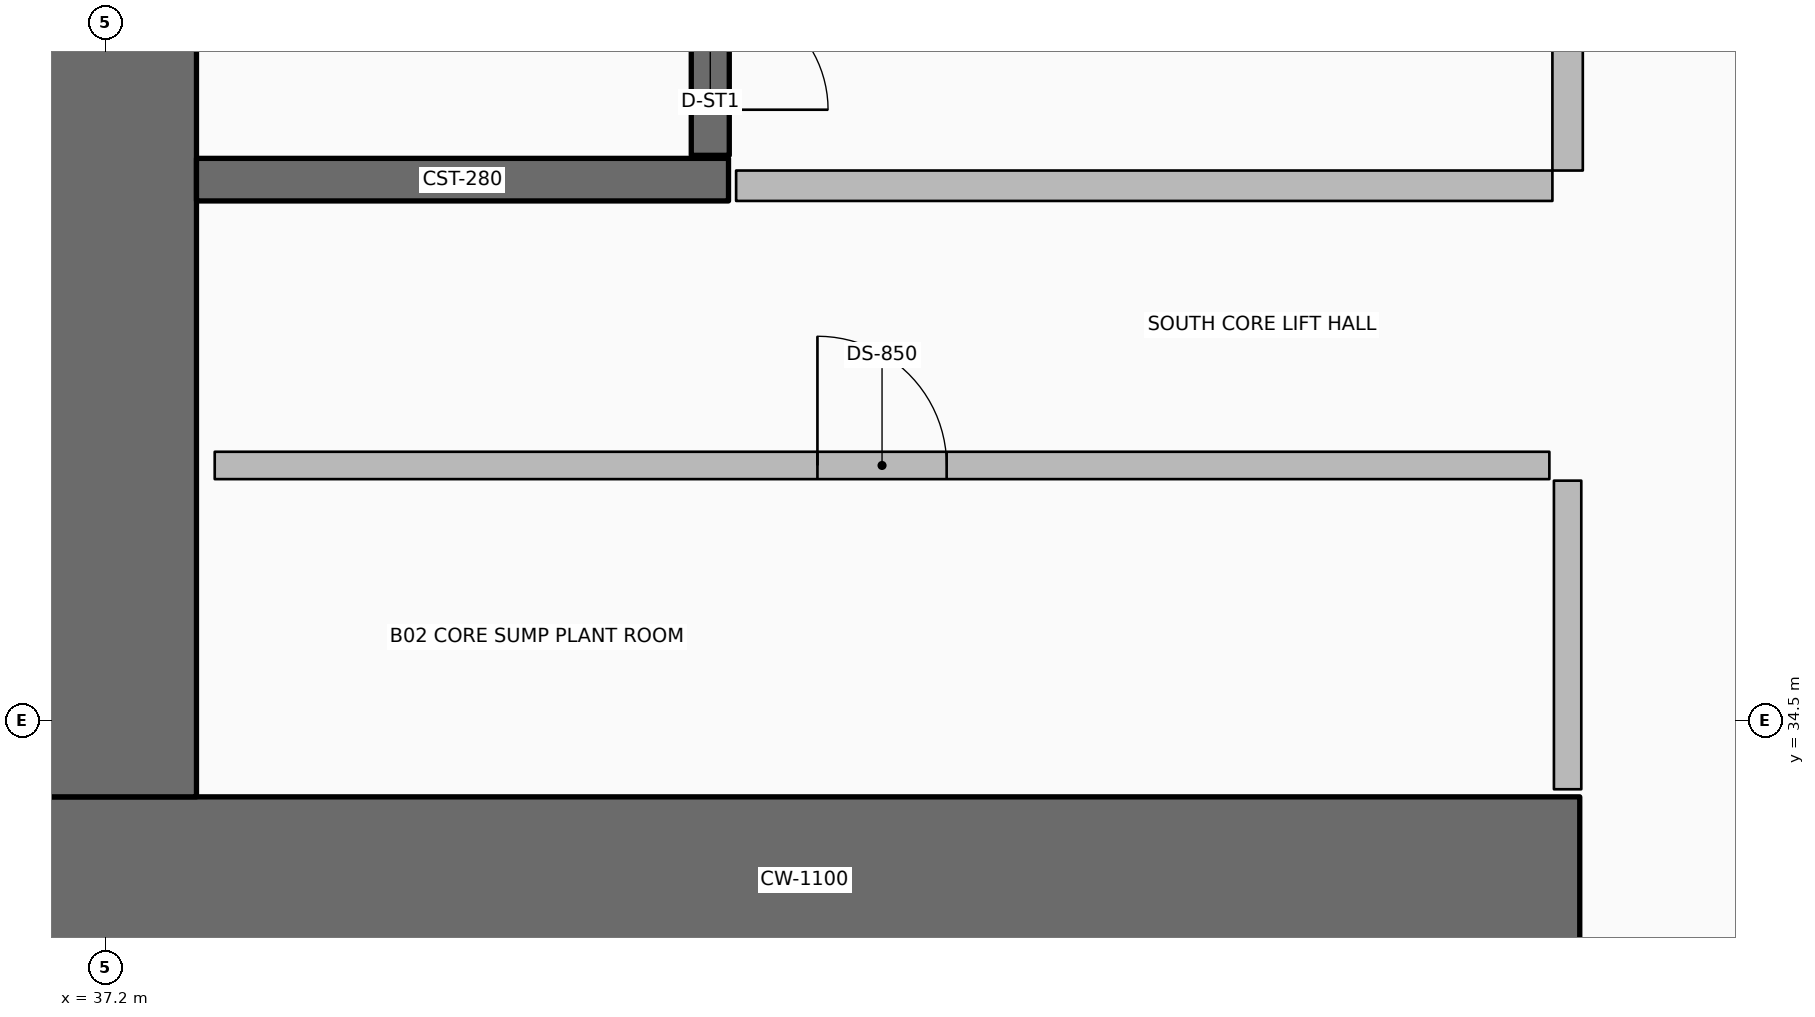
"""IFC4 building model, lengths in metres.
Left out: names, types, materials, properties, quantities, classifications, styles, units other than length and angle.
Written with IfcOpenShell. Run it as: python <this file> out.ifc"""

import sys

from ifc_helpers import new_model, si_unit, direction, frame, frame_2d, origin, place, context, subcontext, project, spatial, rectangle, extrude, element, fill, save


model = new_model("IFC4")
c1 = context("Model", 3, precision=1e-05, world=origin(), true_north=direction((0.0, 1.0)))
c2 = subcontext(c1, "Body", "Model", "MODEL_VIEW")
j1 = project(units=[si_unit("LENGTHUNIT", "METRE"), si_unit("PLANEANGLEUNIT", "RADIAN")], contexts=[c1])
p1 = place(None, origin())
s1 = spatial("IfcSite", under=j1, at=p1, CompositionType="ELEMENT")
p2 = place(p1, origin())
s2 = spatial("IfcBuilding", under=s1, at=p2, CompositionType="ELEMENT")
p3 = place(p2, frame((0.0, 0.0, -7.6)))
s3 = spatial("IfcBuildingStorey", under=s2, at=p3, CompositionType="ELEMENT", Elevation=-7.6)
p4 = place(p3, frame((36.7, 33.45, 0.0), z_axis=(0.0, 0.0, 1.0), x_axis=(1.0, 0.0, 0.0)))
e1 = element("IfcWall", 1, at=p4, inside=s3, PredefinedType="SHEAR", context=c2, shape_type="SweptSolid", body=[
    extrude(rectangle(XDim=10.2, YDim=1.1, at=frame_2d((5.1, 0.0))), origin(), (0.0, 0.0, 1.0), 3.8),
])
p5 = place(p3, frame((37.25, 34.0, 0.0), z_axis=(0.0, 0.0, 1.0), x_axis=(0.0, 1.0, 0.0)))
e2 = element("IfcWall", 2, at=p5, inside=s3, PredefinedType="SHEAR", context=c2, shape_type="SweptSolid", body=[
    extrude(rectangle(XDim=16.0, YDim=1.1, at=frame_2d((8.0, 0.0))), origin(), (0.0, 0.0, 1.0), 3.8),
])
p6 = place(p3, frame((37.8, 38.06, 0.0), z_axis=(0.0, 0.0, 1.0), x_axis=(1.0, 0.0, 0.0)))
e3 = element("IfcWall", 3, at=p6, inside=s3, PredefinedType="SHEAR", context=c2, shape_type="SweptSolid", body=[
    extrude(rectangle(XDim=3.5, YDim=0.28, at=frame_2d((1.75, 0.0))), origin(), (0.0, 0.0, 1.0), 3.8),
])
p7 = place(p3, frame((41.18, 38.22, 0.0), z_axis=(0.0, 0.0, 1.0), x_axis=(0.0, 1.0, 0.0)))
e4 = element("IfcWall", 4, at=p7, inside=s3, PredefinedType="SOLIDWALL", context=c2, shape_type="SweptSolid", body=[
    extrude(rectangle(XDim=7.56, YDim=0.25, at=frame_2d((3.78, 0.0))), origin(), (0.0, 0.0, 1.0), 3.52),
])
p8 = place(p7, frame((0.3, 0.0, 0.0)))
e5 = element("IfcOpeningElement", 5, at=p8, cuts=e4, PredefinedType="OPENING", context=c2, shape_type="SweptSolid", body=[
    extrude(rectangle(XDim=1.55, YDim=2.15, at=frame_2d((0.775, 1.075))), frame((0.0, 0.135, 0.0), z_axis=(0.0, -1.0, 0.0), x_axis=(1.0, 0.0, 0.0)), (0.0, 0.0, 1.0), 0.27),
])
p9 = place(p3, frame((37.92, 36.18, 0.0), z_axis=(0.0, 0.0, 1.0), x_axis=(1.0, 0.0, 0.0)))
e6 = element("IfcWall", 6, at=p9, inside=s3, PredefinedType="PARTITIONING", context=c2, shape_type="SweptSolid", body=[
    extrude(rectangle(XDim=8.78, YDim=0.18, at=frame_2d((4.39, 0.0))), origin(), (0.0, 0.0, 1.0), 3.52),
])
p10 = place(p9, frame((3.965, 0.0, 0.0)))
e7 = element("IfcOpeningElement", 7, at=p10, cuts=e6, PredefinedType="OPENING", context=c2, shape_type="SweptSolid", body=[
    extrude(rectangle(XDim=0.85, YDim=2.06, at=frame_2d((0.425, 1.03))), frame((0.0, 0.1, 0.0), z_axis=(0.0, -1.0, 0.0), x_axis=(1.0, 0.0, 0.0)), (0.0, 0.0, 1.0), 0.2),
])
p11 = place(p3, frame((46.82, 34.05, 0.0), z_axis=(0.0, 0.0, 1.0), x_axis=(0.0, 1.0, 0.0)))
e8 = element("IfcWall", 8, at=p11, inside=s3, PredefinedType="PARTITIONING", context=c2, shape_type="SweptSolid", body=[
    extrude(rectangle(XDim=2.03, YDim=0.18, at=frame_2d((1.015, 0.0))), origin(), (0.0, 0.0, 1.0), 3.52),
])
p12 = place(p3, frame((41.35, 38.02, 0.0), z_axis=(0.0, 0.0, 1.0), x_axis=(1.0, 0.0, 0.0)))
e9 = element("IfcWall", 9, at=p12, inside=s3, PredefinedType="PARTITIONING", context=c2, shape_type="SweptSolid", body=[
    extrude(rectangle(XDim=5.37, YDim=0.2, at=frame_2d((2.685, 0.0))), origin(), (0.0, 0.0, 1.0), 3.52),
])
p13 = place(p3, frame((46.82, 38.12, 0.0), z_axis=(0.0, 0.0, 1.0), x_axis=(0.0, 1.0, 0.0)))
e10 = element("IfcWall", 10, at=p13, inside=s3, PredefinedType="PARTITIONING", context=c2, shape_type="SweptSolid", body=[
    extrude(rectangle(XDim=3.26, YDim=0.2, at=frame_2d((1.63, 0.0))), origin(), (0.0, 0.0, 1.0), 3.52),
])
p14 = place(p13, frame((1.105, 0.0, 0.0)))
e11 = element("IfcOpeningElement", 11, at=p14, cuts=e10, PredefinedType="OPENING", context=c2, shape_type="SweptSolid", body=[
    extrude(rectangle(XDim=1.05, YDim=2.1, at=frame_2d((0.525, 1.05))), frame((0.0, 0.11, 0.0), z_axis=(0.0, -1.0, 0.0), x_axis=(1.0, 0.0, 0.0)), (0.0, 0.0, 1.0), 0.22),
])
p15 = place(p8, origin())
e12 = element("IfcDoor", 12, at=p15, inside=s3, OperationType="DOUBLE_DOOR_SINGLE_SWING", PredefinedType="DOOR", context=c2, shape_type="SweptSolid", body=[
    extrude(rectangle(XDim=1.55, YDim=2.15, at=frame_2d((0.775, 1.075))), frame((0.0, 0.025, 0.0), z_axis=(0.0, -1.0, 0.0), x_axis=(1.0, 0.0, 0.0)), (0.0, 0.0, 1.0), 0.05),
])
fill(e5, e12)
p16 = place(p10, origin())
e13 = element("IfcDoor", 13, at=p16, inside=s3, OperationType="SINGLE_SWING_LEFT", PredefinedType="DOOR", context=c2, shape_type="SweptSolid", body=[
    extrude(rectangle(XDim=0.85, YDim=2.06, at=frame_2d((0.425, 1.03))), frame((0.0, 0.025, 0.0), z_axis=(0.0, -1.0, 0.0), x_axis=(1.0, 0.0, 0.0)), (0.0, 0.0, 1.0), 0.05),
])
fill(e7, e13)
save(model, sys.argv[1])
